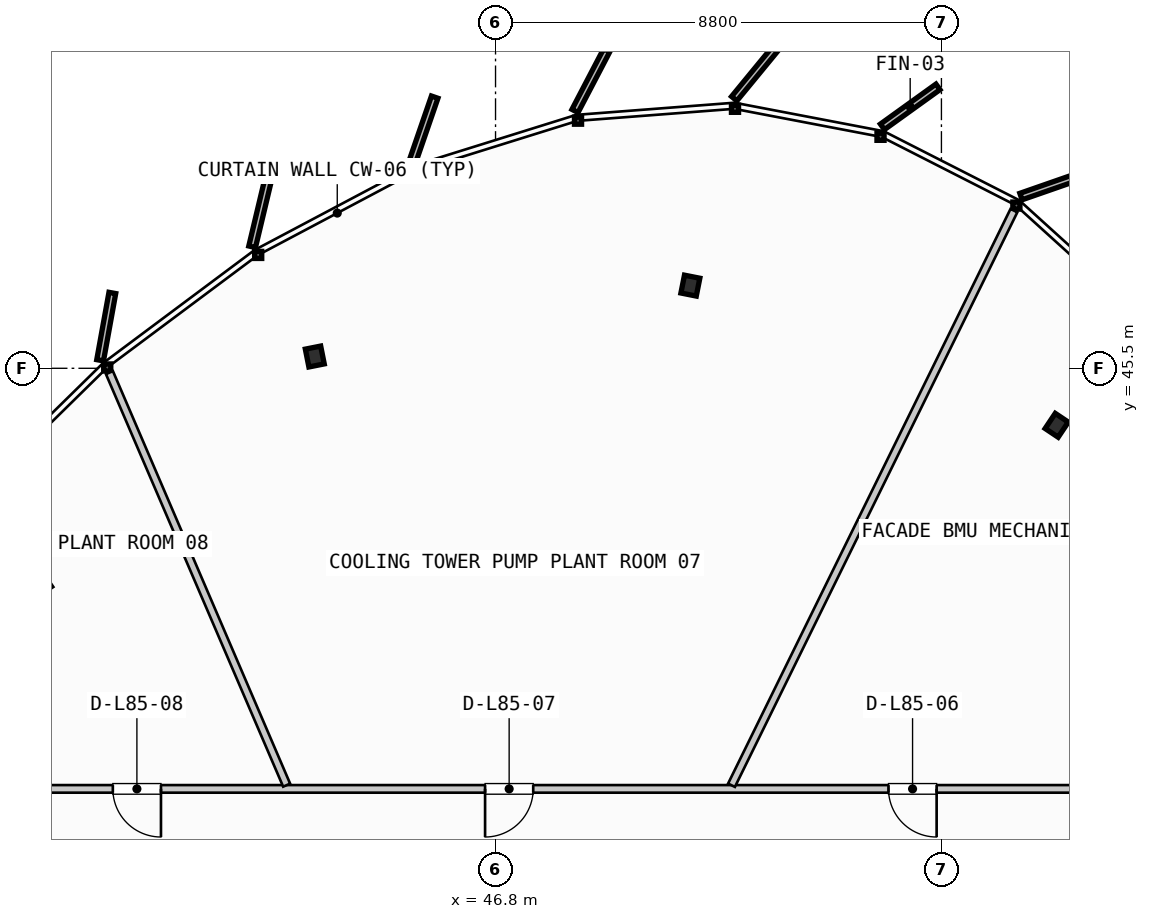
"""IFC4 building model, lengths in metres.
Left out: names, types, materials, properties, quantities, classifications, styles, units other than length and angle.
Written with IfcOpenShell. Run it as: python <this file> out.ifc"""

import sys

from ifc_helpers import new_model, si_unit, direction, frame, frame_2d, origin, origin_2d, place, context, subcontext, project, spatial, rectangle, i_section, extrude, source, transform, mapped, element, fill, save


model = new_model("IFC4")
c1 = context("Model", 3, precision=1e-05, world=origin(), true_north=direction((0.0, 1.0)))
c2 = subcontext(c1, "Body", "Model", "MODEL_VIEW")
j1 = project(units=[si_unit("LENGTHUNIT", "METRE"), si_unit("PLANEANGLEUNIT", "RADIAN")], contexts=[c1])
p1 = place(None, origin())
s1 = spatial("IfcSite", under=j1, at=p1, CompositionType="ELEMENT")
p2 = place(p1, origin())
s2 = spatial("IfcBuilding", under=s1, at=p2, CompositionType="ELEMENT")
p3 = place(p2, frame((0.0, 0.0, 320.3)))
s3 = spatial("IfcBuildingStorey", under=s2, at=p3, CompositionType="ELEMENT", Elevation=320.3)
m1 = source(origin(), c2, "Body", "SweptSolid", [
    extrude(i_section(OverallWidth=0.309, OverallDepth=0.359, WebThickness=0.016, FlangeThickness=0.026, FilletRadius=0.027, at=origin_2d()), origin(), (0.0, 0.0, 1.0), 3.735),
])
for number, where, z_axis, x_axis in (
    (1, (57.875, 44.375, 0.0), (0.0, 0.0, 1.0), (0.556, 0.831, 0.0)),
    (2, (50.645, 47.132, 0.0), (0.0, 0.0, 1.0), (0.195, 0.981, 0.0)),
    (3, (43.233, 45.732, 0.0), (0.0, 0.0, 1.0), (-0.195, 0.981, 0.0)),
):
    element("IfcColumn", number, at=place(p3, frame(where, z_axis=z_axis, x_axis=x_axis)), inside=s3, PredefinedType="COLUMN", context=c2, shape_type="MappedRepresentation", body=[
        mapped(m1, transform((0.0, 0.0, 0.0), scale=1.0)),
    ])
p4 = place(p3, frame((60.5, 37.2, 0.0), z_axis=(0.0, 0.0, 1.0), x_axis=(-1.0, 0.0, 0.0)))
e4 = element("IfcWall", 4, at=p4, inside=s3, PredefinedType="PARTITIONING", context=c2, shape_type="SweptSolid", body=[
    extrude(rectangle(XDim=27.4, YDim=0.15, at=frame_2d((13.7, 0.0))), origin(), (0.0, 0.0, 1.0), 3.26),
])
p5 = place(p4, frame((4.995, 0.0, 0.0)))
e5 = element("IfcOpeningElement", 5, at=p5, cuts=e4, PredefinedType="OPENING", context=c2, shape_type="SweptSolid", body=[
    extrude(rectangle(XDim=0.95, YDim=2.15, at=frame_2d((0.475, 1.075))), frame((0.0, 0.085, 0.0), z_axis=(0.0, -1.0, 0.0), x_axis=(1.0, 0.0, 0.0)), (0.0, 0.0, 1.0), 0.17),
])
p6 = place(p4, frame((12.956, 0.0, 0.0)))
e6 = element("IfcOpeningElement", 6, at=p6, cuts=e4, PredefinedType="OPENING", context=c2, shape_type="SweptSolid", body=[
    extrude(rectangle(XDim=0.95, YDim=2.15, at=frame_2d((0.475, 1.075))), frame((0.0, 0.085, 0.0), z_axis=(0.0, -1.0, 0.0), x_axis=(1.0, 0.0, 0.0)), (0.0, 0.0, 1.0), 0.17),
])
p7 = place(p4, frame((20.303, 0.0, 0.0)))
e7 = element("IfcOpeningElement", 7, at=p7, cuts=e4, PredefinedType="OPENING", context=c2, shape_type="SweptSolid", body=[
    extrude(rectangle(XDim=0.95, YDim=2.15, at=frame_2d((0.475, 1.075))), frame((0.0, 0.085, 0.0), z_axis=(0.0, -1.0, 0.0), x_axis=(1.0, 0.0, 0.0)), (0.0, 0.0, 1.0), 0.17),
])
p8 = place(p3, frame((51.457, 37.272, 0.0), z_axis=(0.0, 0.0, 1.0), x_axis=(0.44109774977, 0.897459066001, 0.0)))
e8 = element("IfcWall", 8, at=p8, inside=s3, PredefinedType="PARTITIONING", context=c2, shape_type="SweptSolid", body=[
    extrude(rectangle(XDim=12.636, YDim=0.15, at=frame_2d((6.318, 0.0))), origin(), (0.0, 0.0, 1.0), 3.26),
])
p9 = place(p3, frame((42.677, 37.273, 0.0), z_axis=(0.0, 0.0, 1.0), x_axis=(-0.394697293261, 0.918811213848, 0.0)))
e9 = element("IfcWall", 9, at=p9, inside=s3, PredefinedType="PARTITIONING", context=c2, shape_type="SweptSolid", body=[
    extrude(rectangle(XDim=8.861, YDim=0.15, at=frame_2d((4.43, 0.0))), origin(), (0.0, 0.0, 1.0), 3.26),
])
m2 = source(origin(), c2, "Body", "SweptSolid", [
    extrude(rectangle(XDim=0.95, YDim=2.15, at=frame_2d((0.475, 1.075))), frame((0.0, 0.025, 0.0), z_axis=(0.0, -1.0, 0.0), x_axis=(1.0, 0.0, 0.0)), (0.0, 0.0, 1.0), 0.05),
])
p10 = place(p5, origin())
e10 = element("IfcDoor", 10, at=p10, inside=s3, OperationType="SINGLE_SWING_LEFT", PredefinedType="DOOR", context=c2, shape_type="MappedRepresentation", body=[
    mapped(m2, transform((0.0, 0.0, 0.0), scale=1.0)),
])
fill(e5, e10)
p11 = place(p6, origin())
e11 = element("IfcDoor", 11, at=p11, inside=s3, OperationType="SINGLE_SWING_RIGHT", PredefinedType="DOOR", context=c2, shape_type="MappedRepresentation", body=[
    mapped(m2, transform((0.0, 0.0, 0.0), scale=1.0)),
])
fill(e6, e11)
p12 = place(p7, origin())
e12 = element("IfcDoor", 12, at=p12, inside=s3, OperationType="SINGLE_SWING_LEFT", PredefinedType="DOOR", context=c2, shape_type="MappedRepresentation", body=[
    mapped(m2, transform((0.0, 0.0, 0.0), scale=1.0)),
])
fill(e7, e12)
save(model, sys.argv[1])
